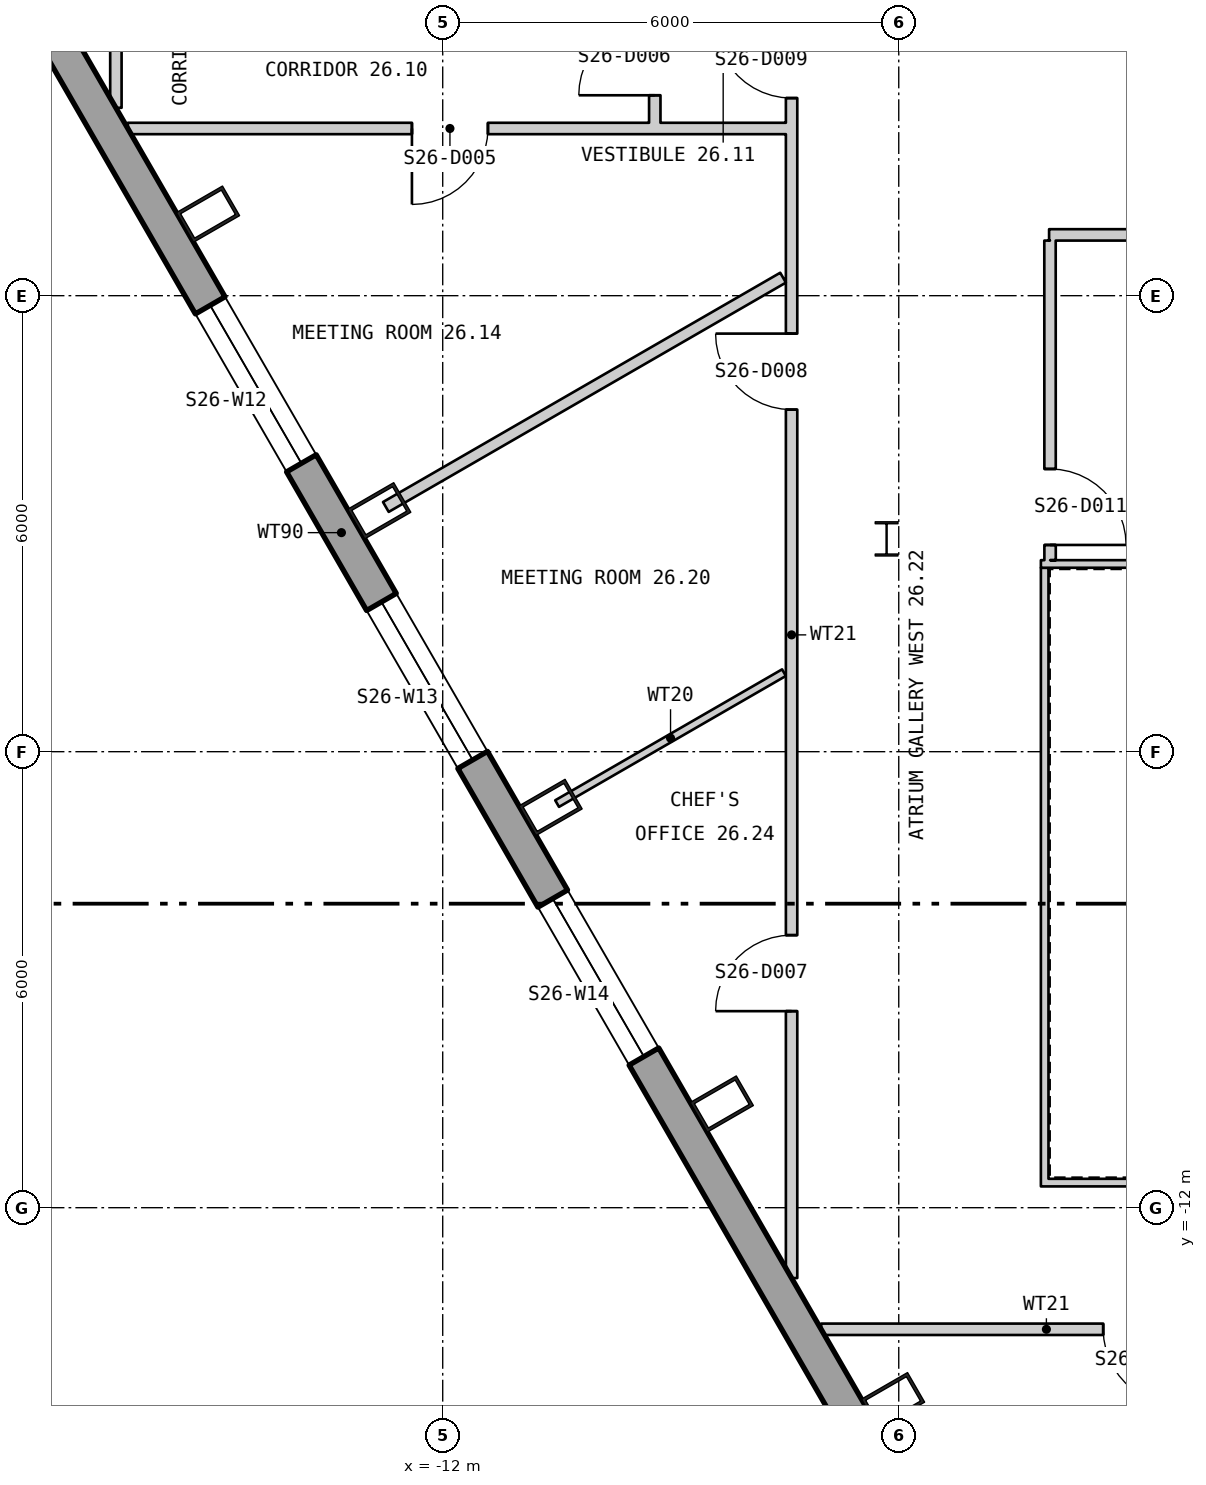
"""IFC4 building model, lengths in metres.
Left out: names, types, materials, properties, quantities, classifications, styles, units other than length and angle.
Written with IfcOpenShell. Run it as: python <this file> out.ifc"""

import sys

from ifc_helpers import new_model, si_unit, direction, frame, frame_2d, origin, origin_2d, place, context, subcontext, project, spatial, polyline, rectangle, hollow_rectangle, i_section, outline, extrude, element, fill, save


model = new_model("IFC4")
c1 = context("Model", 3, precision=1e-05, world=origin(), true_north=direction((0.0, 1.0)))
c2 = subcontext(c1, "Body", "Model", "MODEL_VIEW")
j1 = project(units=[si_unit("LENGTHUNIT", "METRE"), si_unit("PLANEANGLEUNIT", "RADIAN")], contexts=[c1])
p1 = place(None, origin())
s1 = spatial("IfcSite", under=j1, at=p1, CompositionType="ELEMENT")
p2 = place(p1, origin())
s2 = spatial("IfcBuilding", under=s1, at=p2, CompositionType="ELEMENT")
p3 = place(p2, frame((0.0, 0.0, 329.4)))
s3 = spatial("IfcBuildingStorey", under=s2, at=p3, CompositionType="ELEMENT", Elevation=329.4)
for number, where, z_axis, x_axis in (
    (1, (-15.088, 1.073, 0.0), (0.0, 0.0, 1.0), (0.5, -0.866, 0.0)),
    (2, (-12.835, -2.83, 0.0), (0.0, 0.0, 1.0), (0.5, -0.866, 0.0)),
    (3, (-10.581, -6.733, 0.0), (0.0, 0.0, 1.0), (0.5, -0.866, 0.0)),
    (4, (-8.328, -10.636, 0.0), (0.0, 0.0, 1.0), (0.5, -0.866, 0.0)),
    (5, (-6.075, -14.539, 0.0), (0.0, 0.0, 1.0), (0.5, -0.866, 0.0)),
):
    element("IfcColumn", number, at=place(p3, frame(where, z_axis=z_axis, x_axis=x_axis)), inside=s3, PredefinedType="COLUMN", context=c2, shape_type="SweptSolid", body=[
        extrude(hollow_rectangle(XDim=0.45, YDim=0.7, WallThickness=0.04, at=origin_2d()), origin(), (0.0, 0.0, 1.0), 4.2),
    ])
p4 = place(p3, frame((-6.16, -3.2, 0.0), z_axis=(0.0, 0.0, 1.0), x_axis=(1.0, 0.0, 0.0)))
e6 = element("IfcColumn", 6, at=p4, inside=s3, PredefinedType="COLUMN", context=c2, shape_type="SweptSolid", body=[
    extrude(i_section(OverallWidth=0.3, OverallDepth=0.45, WebThickness=0.014, FlangeThickness=0.026, at=origin_2d()), origin(), (0.0, 0.0, 1.0), 4.2),
])
p5 = place(p3, frame((-24.765, 16.684, -0.18), z_axis=(0.0, 0.0, 1.0), x_axis=(0.500000141277, -0.866025322218, 0.0)))
e7 = element("IfcWall", 7, at=p5, inside=s3, PredefinedType="SOLIDWALL", context=c2, shape_type="SweptSolid", body=[
    extrude(outline(polyline([(-0.13, -0.225), (45.86, -0.225), (45.6, 0.225), (0.13, 0.225), (-0.13, -0.225)])), origin(), (0.0, 0.0, 1.0), 3.98),
])
p6 = place(p5, frame((1.424, 0.0, 1.08)))
e8 = element("IfcOpeningElement", 8, at=p6, cuts=e7, PredefinedType="OPENING", context=c2, shape_type="SweptSolid", body=[
    extrude(rectangle(XDim=2.4, YDim=2.3, at=frame_2d((1.2, 1.15))), frame((0.0, 0.235, 0.0), z_axis=(0.0, -1.0, 0.0), x_axis=(1.0, 0.0, 0.0)), (0.0, 0.0, 1.0), 0.47),
])
p7 = place(p5, frame((5.892, 0.0, 1.08)))
e9 = element("IfcOpeningElement", 9, at=p7, cuts=e7, PredefinedType="OPENING", context=c2, shape_type="SweptSolid", body=[
    extrude(rectangle(XDim=2.4, YDim=2.3, at=frame_2d((1.2, 1.15))), frame((0.0, 0.235, 0.0), z_axis=(0.0, -1.0, 0.0), x_axis=(1.0, 0.0, 0.0)), (0.0, 0.0, 1.0), 0.47),
])
p8 = place(p5, frame((10.399, 0.0, 1.08)))
e10 = element("IfcOpeningElement", 10, at=p8, cuts=e7, PredefinedType="OPENING", context=c2, shape_type="SweptSolid", body=[
    extrude(rectangle(XDim=2.4, YDim=2.3, at=frame_2d((1.2, 1.15))), frame((0.0, 0.235, 0.0), z_axis=(0.0, -1.0, 0.0), x_axis=(1.0, 0.0, 0.0)), (0.0, 0.0, 1.0), 0.47),
])
p9 = place(p5, frame((19.412, 0.0, 1.08)))
e11 = element("IfcOpeningElement", 11, at=p9, cuts=e7, PredefinedType="OPENING", context=c2, shape_type="SweptSolid", body=[
    extrude(rectangle(XDim=2.4, YDim=2.3, at=frame_2d((1.2, 1.15))), frame((0.0, 0.235, 0.0), z_axis=(0.0, -1.0, 0.0), x_axis=(1.0, 0.0, 0.0)), (0.0, 0.0, 1.0), 0.47),
])
p10 = place(p5, frame((23.918, 0.0, 1.08)))
e12 = element("IfcOpeningElement", 12, at=p10, cuts=e7, PredefinedType="OPENING", context=c2, shape_type="SweptSolid", body=[
    extrude(rectangle(XDim=2.4, YDim=2.3, at=frame_2d((1.2, 1.15))), frame((0.0, 0.235, 0.0), z_axis=(0.0, -1.0, 0.0), x_axis=(1.0, 0.0, 0.0)), (0.0, 0.0, 1.0), 0.47),
])
p11 = place(p5, frame((28.425, 0.0, 1.08)))
e13 = element("IfcOpeningElement", 13, at=p11, cuts=e7, PredefinedType="OPENING", context=c2, shape_type="SweptSolid", body=[
    extrude(rectangle(XDim=2.4, YDim=2.3, at=frame_2d((1.2, 1.15))), frame((0.0, 0.235, 0.0), z_axis=(0.0, -1.0, 0.0), x_axis=(1.0, 0.0, 0.0)), (0.0, 0.0, 1.0), 0.47),
])
p12 = place(p5, frame((37.438, 0.0, 1.08)))
e14 = element("IfcOpeningElement", 14, at=p12, cuts=e7, PredefinedType="OPENING", context=c2, shape_type="SweptSolid", body=[
    extrude(rectangle(XDim=2.4, YDim=2.3, at=frame_2d((1.2, 1.15))), frame((0.0, 0.235, 0.0), z_axis=(0.0, -1.0, 0.0), x_axis=(1.0, 0.0, 0.0)), (0.0, 0.0, 1.0), 0.47),
])
p13 = place(p5, frame((41.907, 0.0, 1.08)))
e15 = element("IfcOpeningElement", 15, at=p13, cuts=e7, PredefinedType="OPENING", context=c2, shape_type="SweptSolid", body=[
    extrude(rectangle(XDim=2.4, YDim=2.3, at=frame_2d((1.2, 1.15))), frame((0.0, 0.235, 0.0), z_axis=(0.0, -1.0, 0.0), x_axis=(1.0, 0.0, 0.0)), (0.0, 0.0, 1.0), 0.47),
])
for number, where, z_axis, x_axis in (
    (16, (-4.13, -11.67, 0.0), (0.0, 0.0, 1.0), (1.0, 0.0, 0.0)),
    (17, (4.13, -3.53, 0.0), (0.0, 0.0, 1.0), (-1.0, 0.0, 0.0)),
):
    element("IfcWall", number, at=place(p3, frame(where, z_axis=z_axis, x_axis=x_axis)), inside=s3, PredefinedType="PARTITIONING", context=c2, shape_type="SweptSolid", body=[
        extrude(rectangle(XDim=8.26, YDim=0.1, at=frame_2d((4.13, 0.0))), origin(), (0.0, 0.0, 1.0), 4.0),
    ])
p14 = place(p3, frame((-4.08, -3.58, 0.0), z_axis=(0.0, 0.0, 1.0), x_axis=(0.0, -1.0, 0.0)))
e18 = element("IfcWall", 18, at=p14, inside=s3, PredefinedType="PARTITIONING", context=c2, shape_type="SweptSolid", body=[
    extrude(rectangle(XDim=8.04, YDim=0.1, at=frame_2d((4.02, 0.0))), origin(), (0.0, 0.0, 1.0), 4.0),
])
p15 = place(p3, frame((-16.3, 2.472, 0.0), z_axis=(0.0, 0.0, 1.0), x_axis=(0.0, 1.0, 0.0)))
e19 = element("IfcWall", 19, at=p15, inside=s3, PredefinedType="PARTITIONING", context=c2, shape_type="SweptSolid", body=[
    extrude(rectangle(XDim=17.276, YDim=0.15, at=frame_2d((8.638, 0.0))), origin(), (0.0, 0.0, 1.0), 4.0),
])
p16 = place(p15, frame((3.704, 0.0, 0.0)))
e20 = element("IfcOpeningElement", 20, at=p16, cuts=e19, PredefinedType="OPENING", context=c2, shape_type="SweptSolid", body=[
    extrude(rectangle(XDim=1.0, YDim=2.1, at=frame_2d((0.5, 1.05))), frame((0.0, 0.085, 0.0), z_axis=(0.0, -1.0, 0.0), x_axis=(1.0, 0.0, 0.0)), (0.0, 0.0, 1.0), 0.17),
])
p17 = place(p15, frame((9.413, 0.0, 0.0)))
e21 = element("IfcOpeningElement", 21, at=p17, cuts=e19, PredefinedType="OPENING", context=c2, shape_type="SweptSolid", body=[
    extrude(rectangle(XDim=1.0, YDim=2.1, at=frame_2d((0.5, 1.05))), frame((0.0, 0.085, 0.0), z_axis=(0.0, -1.0, 0.0), x_axis=(1.0, 0.0, 0.0)), (0.0, 0.0, 1.0), 0.17),
])
p18 = place(p15, frame((12.944, 0.0, 0.0)))
e22 = element("IfcOpeningElement", 22, at=p18, cuts=e19, PredefinedType="OPENING", context=c2, shape_type="SweptSolid", body=[
    extrude(rectangle(XDim=1.0, YDim=2.1, at=frame_2d((0.5, 1.05))), frame((0.0, 0.085, 0.0), z_axis=(0.0, -1.0, 0.0), x_axis=(1.0, 0.0, 0.0)), (0.0, 0.0, 1.0), 0.17),
])
p19 = place(p3, frame((-16.143, 2.2, 0.0), z_axis=(0.0, 0.0, 1.0), x_axis=(1.0, 0.0, 0.0)))
e23 = element("IfcWall", 23, at=p19, inside=s3, PredefinedType="PARTITIONING", context=c2, shape_type="SweptSolid", body=[
    extrude(rectangle(XDim=8.658, YDim=0.15, at=frame_2d((4.329, 0.0))), origin(), (0.0, 0.0, 1.0), 4.0),
])
p20 = place(p19, frame((3.738, 0.0, 0.0)))
e24 = element("IfcOpeningElement", 24, at=p20, cuts=e23, PredefinedType="OPENING", context=c2, shape_type="SweptSolid", body=[
    extrude(rectangle(XDim=1.0, YDim=2.1, at=frame_2d((0.5, 1.05))), frame((0.0, 0.085, 0.0), z_axis=(0.0, -1.0, 0.0), x_axis=(1.0, 0.0, 0.0)), (0.0, 0.0, 1.0), 0.17),
])
p21 = place(p3, frame((-12.748, -2.78, 0.0), z_axis=(0.0, 0.0, 1.0), x_axis=(0.86604208752, 0.499971101808, 0.0)))
e25 = element("IfcWall", 25, at=p21, inside=s3, PredefinedType="PARTITIONING", context=c2, shape_type="SweptSolid", body=[
    extrude(rectangle(XDim=6.034, YDim=0.15, at=frame_2d((3.017, 0.0))), origin(), (0.0, 0.0, 1.0), 4.0),
])
p22 = place(p3, frame((-10.495, -6.683, 0.0), z_axis=(0.0, 0.0, 1.0), x_axis=(0.866074466908, 0.499915010547, 0.0)))
e26 = element("IfcWall", 26, at=p22, inside=s3, PredefinedType="PARTITIONING", context=c2, shape_type="SweptSolid", body=[
    extrude(rectangle(XDim=3.447, YDim=0.1, at=frame_2d((1.723, 0.0))), origin(), (0.0, 0.0, 1.0), 4.0),
])
p23 = place(p3, frame((-9.21, 2.275, 0.0), z_axis=(0.0, 0.0, 1.0), x_axis=(0.0, 1.0, 0.0)))
e27 = element("IfcWall", 27, at=p23, inside=s3, PredefinedType="PARTITIONING", context=c2, shape_type="SweptSolid", body=[
    extrude(rectangle(XDim=1.725, YDim=0.15, at=frame_2d((0.863, 0.0))), origin(), (0.0, 0.0, 1.0), 4.0),
])
p24 = place(p23, frame((0.362, 0.0, 0.0)))
e28 = element("IfcOpeningElement", 28, at=p24, cuts=e27, PredefinedType="OPENING", context=c2, shape_type="SweptSolid", body=[
    extrude(rectangle(XDim=1.0, YDim=2.1, at=frame_2d((0.5, 1.05))), frame((0.0, 0.085, 0.0), z_axis=(0.0, -1.0, 0.0), x_axis=(1.0, 0.0, 0.0)), (0.0, 0.0, 1.0), 0.17),
])
p25 = place(p3, frame((-7.41, -12.926, 0.0), z_axis=(0.0, 0.0, 1.0), x_axis=(0.0, 1.0, 0.0)))
e29 = element("IfcWall", 29, at=p25, inside=s3, PredefinedType="PARTITIONING", context=c2, shape_type="SweptSolid", body=[
    extrude(rectangle(XDim=16.926, YDim=0.15, at=frame_2d((8.463, 0.0))), origin(), (0.0, 0.0, 1.0), 4.0),
])
p26 = place(p25, frame((3.512, 0.0, 0.0)))
e30 = element("IfcOpeningElement", 30, at=p26, cuts=e29, PredefinedType="OPENING", context=c2, shape_type="SweptSolid", body=[
    extrude(rectangle(XDim=1.0, YDim=2.1, at=frame_2d((0.5, 1.05))), frame((0.0, 0.085, 0.0), z_axis=(0.0, -1.0, 0.0), x_axis=(1.0, 0.0, 0.0)), (0.0, 0.0, 1.0), 0.17),
])
p27 = place(p25, frame((11.427, 0.0, 0.0)))
e31 = element("IfcOpeningElement", 31, at=p27, cuts=e29, PredefinedType="OPENING", context=c2, shape_type="SweptSolid", body=[
    extrude(rectangle(XDim=1.0, YDim=2.1, at=frame_2d((0.5, 1.05))), frame((0.0, 0.085, 0.0), z_axis=(0.0, -1.0, 0.0), x_axis=(1.0, 0.0, 0.0)), (0.0, 0.0, 1.0), 0.17),
])
p28 = place(p25, frame((15.526, 0.0, 0.0)))
e32 = element("IfcOpeningElement", 32, at=p28, cuts=e29, PredefinedType="OPENING", context=c2, shape_type="SweptSolid", body=[
    extrude(rectangle(XDim=1.0, YDim=2.1, at=frame_2d((0.5, 1.05))), frame((0.0, 0.085, 0.0), z_axis=(0.0, -1.0, 0.0), x_axis=(1.0, 0.0, 0.0)), (0.0, 0.0, 1.0), 0.17),
])
p29 = place(p3, frame((-7.021, -13.6, 0.0), z_axis=(0.0, 0.0, 1.0), x_axis=(1.0, 0.0, 0.0)))
e33 = element("IfcWall", 33, at=p29, inside=s3, PredefinedType="PARTITIONING", context=c2, shape_type="SweptSolid", body=[
    extrude(rectangle(XDim=0.606, YDim=0.15, at=frame_2d((0.303, 0.0))), origin(), (0.0, 0.0, 1.0), 4.0),
])
p30 = place(p3, frame((-6.415, -13.6, 0.0), z_axis=(0.0, 0.0, 1.0), x_axis=(1.0, 0.0, 0.0)))
e34 = element("IfcWall", 34, at=p30, inside=s3, PredefinedType="PARTITIONING", context=c2, shape_type="SweptSolid", body=[
    extrude(rectangle(XDim=4.715, YDim=0.15, at=frame_2d((2.357, 0.0))), origin(), (0.0, 0.0, 1.0), 3.21),
])
p31 = place(p30, frame((3.105, 0.0, 0.0)))
e35 = element("IfcOpeningElement", 35, at=p31, cuts=e34, PredefinedType="OPENING", context=c2, shape_type="SweptSolid", body=[
    extrude(rectangle(XDim=1.0, YDim=2.1, at=frame_2d((0.5, 1.05))), frame((0.0, 0.085, 0.0), z_axis=(0.0, -1.0, 0.0), x_axis=(1.0, 0.0, 0.0)), (0.0, 0.0, 1.0), 0.17),
])
p32 = place(p3, frame((-4.022, 0.8, 0.0), z_axis=(0.0, 0.0, 1.0), x_axis=(1.0, 0.0, 0.0)))
e36 = element("IfcWall", 36, at=p32, inside=s3, PredefinedType="PARTITIONING", context=c2, shape_type="SweptSolid", body=[
    extrude(rectangle(XDim=8.043, YDim=0.15, at=frame_2d((4.021, 0.0))), origin(), (0.0, 0.0, 1.0), 4.0),
])
p33 = place(p3, frame((-4.01, 0.725, 0.0), z_axis=(0.0, 0.0, 1.0), x_axis=(0.000237812122, -0.999999971723, 0.0)))
e37 = element("IfcWall", 37, at=p33, inside=s3, PredefinedType="PARTITIONING", context=c2, shape_type="SweptSolid", body=[
    extrude(rectangle(XDim=4.205, YDim=0.15, at=frame_2d((2.103, 0.0))), origin(), (0.0, 0.0, 1.0), 4.0),
])
p34 = place(p33, frame((3.005, 0.0, 0.0)))
e38 = element("IfcOpeningElement", 38, at=p34, cuts=e37, PredefinedType="OPENING", context=c2, shape_type="SweptSolid", body=[
    extrude(rectangle(XDim=1.0, YDim=2.1, at=frame_2d((0.5, 1.05))), frame((0.0, 0.085, 0.0), z_axis=(0.0, -1.0, 0.0), x_axis=(1.0, 0.0, 0.0)), (0.0, 0.0, 1.0), 0.17),
])
p35 = place(p9, origin())
e39 = element("IfcWindow", 39, at=p35, inside=s3, PartitioningType="SINGLE_PANEL", PredefinedType="WINDOW", context=c2, shape_type="SweptSolid", body=[
    extrude(rectangle(XDim=2.4, YDim=2.3, at=frame_2d((1.2, 1.15))), frame((0.0, 0.105, 0.0), z_axis=(0.0, -1.0, 0.0), x_axis=(1.0, 0.0, 0.0)), (0.0, 0.0, 1.0), 0.06),
])
fill(e11, e39)
p36 = place(p10, origin())
e40 = element("IfcWindow", 40, at=p36, inside=s3, PartitioningType="SINGLE_PANEL", PredefinedType="WINDOW", context=c2, shape_type="SweptSolid", body=[
    extrude(rectangle(XDim=2.4, YDim=2.3, at=frame_2d((1.2, 1.15))), frame((0.0, 0.105, 0.0), z_axis=(0.0, -1.0, 0.0), x_axis=(1.0, 0.0, 0.0)), (0.0, 0.0, 1.0), 0.06),
])
fill(e12, e40)
p37 = place(p11, origin())
e41 = element("IfcWindow", 41, at=p37, inside=s3, PartitioningType="SINGLE_PANEL", PredefinedType="WINDOW", context=c2, shape_type="SweptSolid", body=[
    extrude(rectangle(XDim=2.4, YDim=2.3, at=frame_2d((1.2, 1.15))), frame((0.0, 0.105, 0.0), z_axis=(0.0, -1.0, 0.0), x_axis=(1.0, 0.0, 0.0)), (0.0, 0.0, 1.0), 0.06),
])
fill(e13, e41)
p38 = place(p20, origin())
e42 = element("IfcDoor", 42, at=p38, inside=s3, OperationType="SINGLE_SWING_LEFT", PredefinedType="DOOR", context=c2, shape_type="SweptSolid", body=[
    extrude(rectangle(XDim=1.0, YDim=2.1, at=frame_2d((0.5, 1.05))), frame((0.0, 0.025, 0.0), z_axis=(0.0, -1.0, 0.0), x_axis=(1.0, 0.0, 0.0)), (0.0, 0.0, 1.0), 0.05),
])
fill(e24, e42)
p39 = place(p24, origin())
e43 = element("IfcDoor", 43, at=p39, inside=s3, OperationType="SINGLE_SWING_RIGHT", PredefinedType="DOOR", context=c2, shape_type="SweptSolid", body=[
    extrude(rectangle(XDim=1.0, YDim=2.1, at=frame_2d((0.5, 1.05))), frame((0.0, 0.025, 0.0), z_axis=(0.0, -1.0, 0.0), x_axis=(1.0, 0.0, 0.0)), (0.0, 0.0, 1.0), 0.05),
])
fill(e28, e43)
p40 = place(p26, origin())
e44 = element("IfcDoor", 44, at=p40, inside=s3, OperationType="SINGLE_SWING_RIGHT", PredefinedType="DOOR", context=c2, shape_type="SweptSolid", body=[
    extrude(rectangle(XDim=1.0, YDim=2.1, at=frame_2d((0.5, 1.05))), frame((0.0, 0.025, 0.0), z_axis=(0.0, -1.0, 0.0), x_axis=(1.0, 0.0, 0.0)), (0.0, 0.0, 1.0), 0.05),
])
fill(e30, e44)
p41 = place(p27, origin())
e45 = element("IfcDoor", 45, at=p41, inside=s3, OperationType="SINGLE_SWING_LEFT", PredefinedType="DOOR", context=c2, shape_type="SweptSolid", body=[
    extrude(rectangle(XDim=1.0, YDim=2.1, at=frame_2d((0.5, 1.05))), frame((0.0, 0.025, 0.0), z_axis=(0.0, -1.0, 0.0), x_axis=(1.0, 0.0, 0.0)), (0.0, 0.0, 1.0), 0.05),
])
fill(e31, e45)
p42 = place(p28, origin())
e46 = element("IfcDoor", 46, at=p42, inside=s3, OperationType="SINGLE_SWING_LEFT", PredefinedType="DOOR", context=c2, shape_type="SweptSolid", body=[
    extrude(rectangle(XDim=1.0, YDim=2.1, at=frame_2d((0.5, 1.05))), frame((0.0, 0.025, 0.0), z_axis=(0.0, -1.0, 0.0), x_axis=(1.0, 0.0, 0.0)), (0.0, 0.0, 1.0), 0.05),
])
fill(e32, e46)
p43 = place(p31, origin())
e47 = element("IfcDoor", 47, at=p43, inside=s3, OperationType="SINGLE_SWING_RIGHT", PredefinedType="DOOR", context=c2, shape_type="SweptSolid", body=[
    extrude(rectangle(XDim=1.0, YDim=2.1, at=frame_2d((0.5, 1.05))), frame((0.0, 0.025, 0.0), z_axis=(0.0, -1.0, 0.0), x_axis=(1.0, 0.0, 0.0)), (0.0, 0.0, 1.0), 0.05),
])
fill(e35, e47)
p44 = place(p34, origin())
e48 = element("IfcDoor", 48, at=p44, inside=s3, OperationType="SINGLE_SWING_LEFT", PredefinedType="DOOR", context=c2, shape_type="SweptSolid", body=[
    extrude(rectangle(XDim=1.0, YDim=2.1, at=frame_2d((0.5, 1.05))), frame((0.0, 0.025, 0.0), z_axis=(0.0, -1.0, 0.0), x_axis=(1.0, 0.0, 0.0)), (0.0, 0.0, 1.0), 0.05),
])
fill(e38, e48)
save(model, sys.argv[1])
